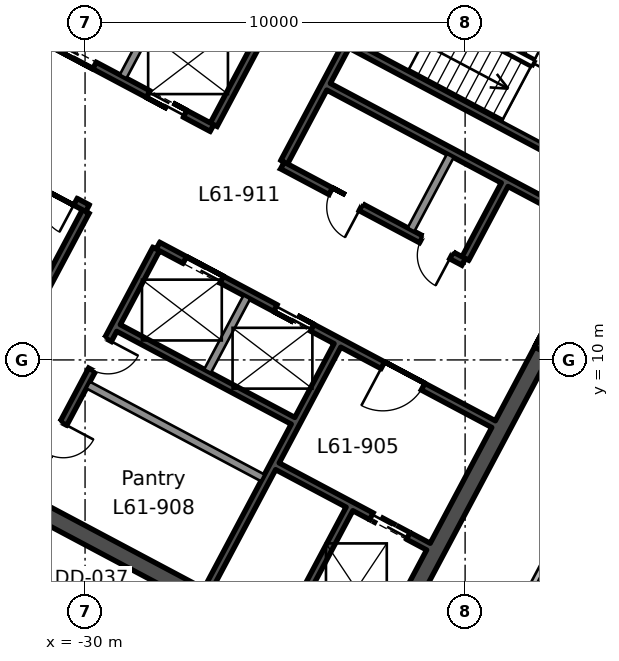
"""IFC4 building model, lengths in metres.
Left out: names, types, materials, properties, quantities, classifications, styles, units other than length and angle.
Written with IfcOpenShell. Run it as: python <this file> out.ifc"""

import sys

from ifc_helpers import new_model, si_unit, direction, frame, frame_2d, origin, place, context, subcontext, project, spatial, rectangle, extrude, element, fill, save


model = new_model("IFC4")
c1 = context("Model", 3, precision=1e-05, world=origin(), true_north=direction((0.0, 1.0)))
c2 = subcontext(c1, "Body", "Model", "MODEL_VIEW")
j1 = project(units=[si_unit("LENGTHUNIT", "METRE"), si_unit("PLANEANGLEUNIT", "RADIAN")], contexts=[c1])
p1 = place(None, origin())
s1 = spatial("IfcSite", under=j1, at=p1, CompositionType="ELEMENT")
p2 = place(p1, origin())
s2 = spatial("IfcBuilding", under=s1, at=p2, CompositionType="ELEMENT")
p3 = place(p2, frame((0.0, 0.0, 273.6)))
s3 = spatial("IfcBuildingStorey", under=s2, at=p3, CompositionType="ELEMENT", Elevation=273.6)
p4 = place(p3, frame((-13.771, 18.138, 0.0), z_axis=(0.0, 0.0, 1.0), x_axis=(-0.469467968382, -0.882949504028, 0.0)))
e1 = element("IfcWall", 1, at=p4, inside=s3, PredefinedType="SHEAR", context=c2, shape_type="SweptSolid", body=[
    extrude(rectangle(XDim=19.1, YDim=0.45, at=frame_2d((9.55, 0.0))), origin(), (0.0, 0.0, 1.0), 3.9),
])
p5 = place(p4, frame((6.55, 0.0, 0.0)))
e2 = element("IfcOpeningElement", 2, at=p5, cuts=e1, PredefinedType="OPENING", context=c2, shape_type="SweptSolid", body=[
    extrude(rectangle(XDim=2.4, YDim=2.4, at=frame_2d((1.2, 1.2))), frame((0.0, 0.235, 0.0), z_axis=(0.0, -1.0, 0.0), x_axis=(1.0, 0.0, 0.0)), (0.0, 0.0, 1.0), 0.47),
])
p6 = place(p3, frame((-14.076, 18.045, 0.0), z_axis=(0.0, 0.0, 1.0), x_axis=(-0.882947755831, 0.46947125628, 0.0)))
e3 = element("IfcWall", 3, at=p6, inside=s3, PredefinedType="SHEAR", context=c2, shape_type="SweptSolid", body=[
    extrude(rectangle(XDim=20.2, YDim=0.45, at=frame_2d((10.1, 0.0))), origin(), (0.0, 0.0, 1.0), 3.9),
])
p7 = place(p3, frame((-22.832, 1.578, 0.0), z_axis=(0.0, 0.0, 1.0), x_axis=(-0.88294509198, 0.469476266226, 0.0)))
e4 = element("IfcWall", 4, at=p7, inside=s3, PredefinedType="SHEAR", context=c2, shape_type="SweptSolid", body=[
    extrude(rectangle(XDim=20.2, YDim=0.45, at=frame_2d((10.1, 0.0))), origin(), (0.0, 0.0, 1.0), 3.9),
])
p8 = place(p3, frame((-23.043, 6.08, 0.0), z_axis=(0.0, 0.0, 1.0), x_axis=(-0.469494272526, -0.882935517501, 0.0)))
e5 = element("IfcWall", 5, at=p8, inside=s3, PredefinedType="SHEAR", context=c2, shape_type="SweptSolid", body=[
    extrude(rectangle(XDim=3.65, YDim=0.2, at=frame_2d((1.825, 0.0))), origin(), (0.0, 0.0, 1.0), 3.9),
])
p9 = place(p3, frame((-18.96, 14.611, 0.0), z_axis=(0.0, 0.0, 1.0), x_axis=(-0.4694473164, -0.882960484464, 0.0)))
e6 = element("IfcWall", 6, at=p9, inside=s3, PredefinedType="SHEAR", context=c2, shape_type="SweptSolid", body=[
    extrude(rectangle(XDim=2.2, YDim=0.2, at=frame_2d((1.1, 0.0))), origin(), (0.0, 0.0, 1.0), 3.9),
])
p10 = place(p3, frame((-20.39, 15.372, 0.0), z_axis=(0.0, 0.0, 1.0), x_axis=(-0.4694473164, -0.882960484464, 0.0)))
e7 = element("IfcWall", 7, at=p10, inside=s3, PredefinedType="SOLIDWALL", context=c2, shape_type="SweptSolid", body=[
    extrude(rectangle(XDim=2.2, YDim=0.2, at=frame_2d((1.1, 0.0))), origin(), (0.0, 0.0, 1.0), 3.9),
])
p11 = place(p3, frame((-23.36, 10.382, 0.0), z_axis=(0.0, 0.0, 1.0), x_axis=(-0.469480409012, -0.88294288918, 0.0)))
e8 = element("IfcWall", 8, at=p11, inside=s3, PredefinedType="SHEAR", context=c2, shape_type="SweptSolid", body=[
    extrude(rectangle(XDim=7.3, YDim=0.2, at=frame_2d((3.65, 0.0))), origin(), (0.0, 0.0, 1.0), 3.9),
])
p12 = place(p3, frame((-25.744, 11.65, 0.0), z_axis=(0.0, 0.0, 1.0), x_axis=(-0.469487830541, -0.882938942948, 0.0)))
e9 = element("IfcWall", 9, at=p12, inside=s3, PredefinedType="SOLIDWALL", context=c2, shape_type="SweptSolid", body=[
    extrude(rectangle(XDim=2.2, YDim=0.2, at=frame_2d((1.1, 0.0))), origin(), (0.0, 0.0, 1.0), 3.9),
])
p13 = place(p3, frame((-21.333, 21.649, 0.0), z_axis=(0.0, 0.0, 1.0), x_axis=(-0.469494272526, -0.882935517501, 0.0)))
e10 = element("IfcWall", 10, at=p13, inside=s3, PredefinedType="SHEAR", context=c2, shape_type="SweptSolid", body=[
    extrude(rectangle(XDim=7.3, YDim=0.2, at=frame_2d((3.65, 0.0))), origin(), (0.0, 0.0, 1.0), 3.9),
])
p14 = place(p13, frame((1.3, 0.0, 0.0)))
e11 = element("IfcOpeningElement", 11, at=p14, cuts=e10, PredefinedType="OPENING", context=c2, shape_type="SweptSolid", body=[
    extrude(rectangle(XDim=1.2, YDim=2.1, at=frame_2d((0.6, 1.05))), frame((0.0, 0.11, 0.0), z_axis=(0.0, -1.0, 0.0), x_axis=(1.0, 0.0, 0.0)), (0.0, 0.0, 1.0), 0.22),
])
p15 = place(p3, frame((-28.128, 12.917, 0.0), z_axis=(0.0, 0.0, 1.0), x_axis=(-0.469454336211, -0.882956752176, 0.0)))
e12 = element("IfcWall", 12, at=p15, inside=s3, PredefinedType="SHEAR", context=c2, shape_type="SweptSolid", body=[
    extrude(rectangle(XDim=7.3, YDim=0.2, at=frame_2d((3.65, 0.0))), origin(), (0.0, 0.0, 1.0), 3.9),
])
p16 = place(p15, frame((2.7, 0.0, 0.0)))
e13 = element("IfcOpeningElement", 13, at=p16, cuts=e12, PredefinedType="OPENING", context=c2, shape_type="SweptSolid", body=[
    extrude(rectangle(XDim=0.9, YDim=2.1, at=frame_2d((0.45, 1.05))), frame((0.0, 0.11, 0.0), z_axis=(0.0, -1.0, 0.0), x_axis=(1.0, 0.0, 0.0)), (0.0, 0.0, 1.0), 0.22),
])
p17 = place(p15, frame((5.2, 0.0, 0.0)))
e14 = element("IfcOpeningElement", 14, at=p17, cuts=e12, PredefinedType="OPENING", context=c2, shape_type="SweptSolid", body=[
    extrude(rectangle(XDim=0.9, YDim=2.1, at=frame_2d((0.45, 1.05))), frame((0.0, 0.11, 0.0), z_axis=(0.0, -1.0, 0.0), x_axis=(1.0, 0.0, 0.0)), (0.0, 0.0, 1.0), 0.22),
])
p18 = place(p3, frame((-23.188, 22.635, 0.0), z_axis=(0.0, 0.0, 1.0), x_axis=(-0.469454336211, -0.882956752176, 0.0)))
e15 = element("IfcWall", 15, at=p18, inside=s3, PredefinedType="SHEAR", context=c2, shape_type="SweptSolid", body=[
    extrude(rectangle(XDim=7.3, YDim=0.2, at=frame_2d((3.65, 0.0))), origin(), (0.0, 0.0, 1.0), 3.9),
])
p19 = place(p18, frame((0.8, 0.0, 0.0)))
e16 = element("IfcOpeningElement", 16, at=p19, cuts=e15, PredefinedType="OPENING", context=c2, shape_type="SweptSolid", body=[
    extrude(rectangle(XDim=0.9, YDim=2.1, at=frame_2d((0.45, 1.05))), frame((0.0, 0.11, 0.0), z_axis=(0.0, -1.0, 0.0), x_axis=(1.0, 0.0, 0.0)), (0.0, 0.0, 1.0), 0.22),
])
p20 = place(p18, frame((3.3, 0.0, 0.0)))
e17 = element("IfcOpeningElement", 17, at=p20, cuts=e15, PredefinedType="OPENING", context=c2, shape_type="SweptSolid", body=[
    extrude(rectangle(XDim=0.9, YDim=2.1, at=frame_2d((0.45, 1.05))), frame((0.0, 0.11, 0.0), z_axis=(0.0, -1.0, 0.0), x_axis=(1.0, 0.0, 0.0)), (0.0, 0.0, 1.0), 0.22),
])
p21 = place(p3, frame((-29.982, 13.903, 0.0), z_axis=(0.0, 0.0, 1.0), x_axis=(-0.469454336211, -0.882956752176, 0.0)))
e18 = element("IfcWall", 18, at=p21, inside=s3, PredefinedType="SHEAR", context=c2, shape_type="SweptSolid", body=[
    extrude(rectangle(XDim=7.3, YDim=0.2, at=frame_2d((3.65, 0.0))), origin(), (0.0, 0.0, 1.0), 3.9),
])
p22 = place(p21, frame((4.8, 0.0, 0.0)))
e19 = element("IfcOpeningElement", 19, at=p22, cuts=e18, PredefinedType="OPENING", context=c2, shape_type="SweptSolid", body=[
    extrude(rectangle(XDim=1.2, YDim=2.1, at=frame_2d((0.6, 1.05))), frame((0.0, 0.11, 0.0), z_axis=(0.0, -1.0, 0.0), x_axis=(1.0, 0.0, 0.0)), (0.0, 0.0, 1.0), 0.22),
])
p23 = place(p3, frame((-27.966, 19.4, 0.0), z_axis=(0.0, 0.0, 1.0), x_axis=(-0.4694473164, -0.882960484464, 0.0)))
e20 = element("IfcWall", 20, at=p23, inside=s3, PredefinedType="SOLIDWALL", context=c2, shape_type="SweptSolid", body=[
    extrude(rectangle(XDim=2.2, YDim=0.2, at=frame_2d((1.1, 0.0))), origin(), (0.0, 0.0, 1.0), 3.9),
])
p24 = place(p3, frame((-15.942, 14.536, 0.0), z_axis=(0.0, 0.0, 1.0), x_axis=(-0.882946947542, 0.469472776449, 0.0)))
e21 = element("IfcWall", 21, at=p24, inside=s3, PredefinedType="SHEAR", context=c2, shape_type="SweptSolid", body=[
    extrude(rectangle(XDim=8.0, YDim=0.2, at=frame_2d((4.0, 0.0))), origin(), (0.0, 0.0, 1.0), 3.9),
])
p25 = place(p3, frame((-16.529, 13.432, 0.0), z_axis=(0.0, 0.0, 1.0), x_axis=(-0.88295287151, 0.469461634952, 0.0)))
e22 = element("IfcWall", 22, at=p25, inside=s3, PredefinedType="SHEAR", context=c2, shape_type="SweptSolid", body=[
    extrude(rectangle(XDim=8.0, YDim=0.2, at=frame_2d((4.0, 0.0))), origin(), (0.0, 0.0, 1.0), 3.9),
])
p26 = place(p3, frame((-20.04, 12.581, 0.0), z_axis=(0.0, 0.0, 1.0), x_axis=(-0.882942972946, 0.469480251476, 0.0)))
e23 = element("IfcWall", 23, at=p26, inside=s3, PredefinedType="SHEAR", context=c2, shape_type="SweptSolid", body=[
    extrude(rectangle(XDim=5.4, YDim=0.2, at=frame_2d((2.7, 0.0))), origin(), (0.0, 0.0, 1.0), 3.9),
])
p27 = place(p26, frame((0.36, 0.0, 0.0)))
e24 = element("IfcOpeningElement", 24, at=p27, cuts=e23, PredefinedType="OPENING", context=c2, shape_type="SweptSolid", body=[
    extrude(rectangle(XDim=0.9, YDim=2.1, at=frame_2d((0.45, 1.05))), frame((0.0, 0.11, 0.0), z_axis=(0.0, -1.0, 0.0), x_axis=(1.0, 0.0, 0.0)), (0.0, 0.0, 1.0), 0.22),
])
p28 = place(p26, frame((3.06, 0.0, 0.0)))
e25 = element("IfcOpeningElement", 25, at=p28, cuts=e23, PredefinedType="OPENING", context=c2, shape_type="SweptSolid", body=[
    extrude(rectangle(XDim=0.9, YDim=2.1, at=frame_2d((0.45, 1.05))), frame((0.0, 0.11, 0.0), z_axis=(0.0, -1.0, 0.0), x_axis=(1.0, 0.0, 0.0)), (0.0, 0.0, 1.0), 0.22),
])
p29 = place(p3, frame((-26.662, 16.102, 0.0), z_axis=(0.0, 0.0, 1.0), x_axis=(-0.882940221191, 0.469485426614, 0.0)))
e26 = element("IfcWall", 26, at=p29, inside=s3, PredefinedType="SHEAR", context=c2, shape_type="SweptSolid", body=[
    extrude(rectangle(XDim=10.0, YDim=0.2, at=frame_2d((5.0, 0.0))), origin(), (0.0, 0.0, 1.0), 3.9),
])
p30 = place(p29, frame((6.3, 0.0, 0.0)))
e27 = element("IfcOpeningElement", 27, at=p30, cuts=e26, PredefinedType="OPENING", context=c2, shape_type="SweptSolid", body=[
    extrude(rectangle(XDim=1.2, YDim=2.1, at=frame_2d((0.6, 1.05))), frame((0.0, 0.11, 0.0), z_axis=(0.0, -1.0, 0.0), x_axis=(1.0, 0.0, 0.0)), (0.0, 0.0, 1.0), 0.22),
])
p31 = place(p29, frame((0.8, 0.0, 0.0)))
e28 = element("IfcOpeningElement", 28, at=p31, cuts=e26, PredefinedType="OPENING", context=c2, shape_type="SweptSolid", body=[
    extrude(rectangle(XDim=1.1, YDim=2.1, at=frame_2d((0.55, 1.05))), frame((0.0, 0.11, 0.0), z_axis=(0.0, -1.0, 0.0), x_axis=(1.0, 0.0, 0.0)), (0.0, 0.0, 1.0), 0.22),
])
p32 = place(p29, frame((3.5, 0.0, 0.0)))
e29 = element("IfcOpeningElement", 29, at=p32, cuts=e26, PredefinedType="OPENING", context=c2, shape_type="SweptSolid", body=[
    extrude(rectangle(XDim=1.1, YDim=2.1, at=frame_2d((0.55, 1.05))), frame((0.0, 0.11, 0.0), z_axis=(0.0, -1.0, 0.0), x_axis=(1.0, 0.0, 0.0)), (0.0, 0.0, 1.0), 0.22),
])
p33 = place(p3, frame((-19.252, 8.311, 0.0), z_axis=(0.0, 0.0, 1.0), x_axis=(-0.882955722218, 0.469456273365, 0.0)))
e30 = element("IfcWall", 30, at=p33, inside=s3, PredefinedType="SHEAR", context=c2, shape_type="SweptSolid", body=[
    extrude(rectangle(XDim=10.0, YDim=0.2, at=frame_2d((5.0, 0.0))), origin(), (0.0, 0.0, 1.0), 3.9),
])
p34 = place(p33, frame((2.1, 0.0, 0.0)))
e31 = element("IfcOpeningElement", 31, at=p34, cuts=e30, PredefinedType="OPENING", context=c2, shape_type="SweptSolid", body=[
    extrude(rectangle(XDim=1.2, YDim=2.1, at=frame_2d((0.6, 1.05))), frame((0.0, 0.11, 0.0), z_axis=(0.0, -1.0, 0.0), x_axis=(1.0, 0.0, 0.0)), (0.0, 0.0, 1.0), 0.22),
])
p35 = place(p33, frame((5.4, 0.0, 0.0)))
e32 = element("IfcOpeningElement", 32, at=p35, cuts=e30, PredefinedType="OPENING", context=c2, shape_type="SweptSolid", body=[
    extrude(rectangle(XDim=1.1, YDim=2.1, at=frame_2d((0.55, 1.05))), frame((0.0, 0.11, 0.0), z_axis=(0.0, -1.0, 0.0), x_axis=(1.0, 0.0, 0.0)), (0.0, 0.0, 1.0), 0.22),
])
p36 = place(p33, frame((8.1, 0.0, 0.0)))
e33 = element("IfcOpeningElement", 33, at=p36, cuts=e30, PredefinedType="OPENING", context=c2, shape_type="SweptSolid", body=[
    extrude(rectangle(XDim=1.1, YDim=2.1, at=frame_2d((0.55, 1.05))), frame((0.0, 0.11, 0.0), z_axis=(0.0, -1.0, 0.0), x_axis=(1.0, 0.0, 0.0)), (0.0, 0.0, 1.0), 0.22),
])
p37 = place(p3, frame((-29.935, 13.991, 0.0), z_axis=(0.0, 0.0, 1.0), x_axis=(-0.882952937579, 0.469461510692, 0.0)))
e34 = element("IfcWall", 34, at=p37, inside=s3, PredefinedType="SHEAR", context=c2, shape_type="SweptSolid", body=[
    extrude(rectangle(XDim=5.4, YDim=0.2, at=frame_2d((2.7, 0.0))), origin(), (0.0, 0.0, 1.0), 3.9),
])
p38 = place(p37, frame((0.36, 0.0, 0.0)))
e35 = element("IfcOpeningElement", 35, at=p38, cuts=e34, PredefinedType="OPENING", context=c2, shape_type="SweptSolid", body=[
    extrude(rectangle(XDim=0.9, YDim=2.1, at=frame_2d((0.45, 1.05))), frame((0.0, 0.11, 0.0), z_axis=(0.0, -1.0, 0.0), x_axis=(1.0, 0.0, 0.0)), (0.0, 0.0, 1.0), 0.22),
])
p39 = place(p37, frame((3.06, 0.0, 0.0)))
e36 = element("IfcOpeningElement", 36, at=p39, cuts=e34, PredefinedType="OPENING", context=c2, shape_type="SweptSolid", body=[
    extrude(rectangle(XDim=0.9, YDim=2.1, at=frame_2d((0.45, 1.05))), frame((0.0, 0.11, 0.0), z_axis=(0.0, -1.0, 0.0), x_axis=(1.0, 0.0, 0.0)), (0.0, 0.0, 1.0), 0.22),
])
p40 = place(p3, frame((-24.528, 8.398, 0.0), z_axis=(0.0, 0.0, 1.0), x_axis=(-0.882953967957, 0.469459572775, 0.0)))
e37 = element("IfcWall", 37, at=p40, inside=s3, PredefinedType="SHEAR", context=c2, shape_type="SweptSolid", body=[
    extrude(rectangle(XDim=5.2, YDim=0.2, at=frame_2d((2.6, 0.0))), origin(), (0.0, 0.0, 1.0), 3.9),
])
p41 = place(p3, frame((-20.965, 5.088, 0.0), z_axis=(0.0, 0.0, 1.0), x_axis=(-0.882925986334, 0.469512196493, 0.0)))
e38 = element("IfcWall", 38, at=p41, inside=s3, PredefinedType="SHEAR", context=c2, shape_type="SweptSolid", body=[
    extrude(rectangle(XDim=4.5, YDim=0.2, at=frame_2d((2.25, 0.0))), origin(), (0.0, 0.0, 1.0), 3.9),
])
p42 = place(p41, frame((0.6, 0.0, 0.0)))
e39 = element("IfcOpeningElement", 39, at=p42, cuts=e38, PredefinedType="OPENING", context=c2, shape_type="SweptSolid", body=[
    extrude(rectangle(XDim=1.1, YDim=2.1, at=frame_2d((0.55, 1.05))), frame((0.0, 0.11, 0.0), z_axis=(0.0, -1.0, 0.0), x_axis=(1.0, 0.0, 0.0)), (0.0, 0.0, 1.0), 0.22),
])
p43 = place(p3, frame((-25.326, 6.897, 0.0), z_axis=(0.0, 0.0, 1.0), x_axis=(-0.882953967957, 0.469459572775, 0.0)))
e40 = element("IfcWall", 40, at=p43, inside=s3, PredefinedType="SOLIDWALL", context=c2, shape_type="SweptSolid", body=[
    extrude(rectangle(XDim=5.2, YDim=0.2, at=frame_2d((2.6, 0.0))), origin(), (0.0, 0.0, 1.0), 3.9),
])
p44 = place(p3, frame((-48.812, 39.771, 0.0), z_axis=(0.0, 0.0, 1.0), x_axis=(0.882945384259, -0.469475716535, 0.0)))
e41 = element("IfcWall", 41, at=p44, inside=s3, PredefinedType="PARTITIONING", context=c2, shape_type="SweptSolid", body=[
    extrude(rectangle(XDim=55.283, YDim=0.15, at=frame_2d((27.642, 0.0))), origin(), (0.0, 0.0, 1.0), 3.54),
])
p45 = place(p44, frame((33.85, 0.0, 0.0)))
e42 = element("IfcOpeningElement", 42, at=p45, cuts=e41, PredefinedType="OPENING", context=c2, shape_type="SweptSolid", body=[
    extrude(rectangle(XDim=1.8, YDim=2.1, at=frame_2d((0.9, 1.05))), frame((0.0, 0.085, 0.0), z_axis=(0.0, -1.0, 0.0), x_axis=(1.0, 0.0, 0.0)), (0.0, 0.0, 1.0), 0.17),
])
p46 = place(p44, frame((27.15, 0.0, 0.0)))
e43 = element("IfcOpeningElement", 43, at=p46, cuts=e41, PredefinedType="OPENING", context=c2, shape_type="SweptSolid", body=[
    extrude(rectangle(XDim=1.0, YDim=2.1, at=frame_2d((0.5, 1.05))), frame((0.0, 0.085, 0.0), z_axis=(0.0, -1.0, 0.0), x_axis=(1.0, 0.0, 0.0)), (0.0, 0.0, 1.0), 0.17),
])
p47 = place(p44, frame((15.55, 0.0, 0.0)))
e44 = element("IfcOpeningElement", 44, at=p47, cuts=e41, PredefinedType="OPENING", context=c2, shape_type="SweptSolid", body=[
    extrude(rectangle(XDim=1.0, YDim=2.1, at=frame_2d((0.5, 1.05))), frame((0.0, 0.085, 0.0), z_axis=(0.0, -1.0, 0.0), x_axis=(1.0, 0.0, 0.0)), (0.0, 0.0, 1.0), 0.17),
])
p48 = place(p3, frame((-13.8, -6.48, 0.0), z_axis=(0.0, 0.0, 1.0), x_axis=(-0.882943991273, 0.469478336322, 0.0)))
e45 = element("IfcWall", 45, at=p48, inside=s3, PredefinedType="PARTITIONING", context=c2, shape_type="SweptSolid", body=[
    extrude(rectangle(XDim=36.33, YDim=0.15, at=frame_2d((18.165, 0.0))), origin(), (0.0, 0.0, 1.0), 3.54),
])
p49 = place(p48, frame((20.15, 0.0, 0.0)))
e46 = element("IfcOpeningElement", 46, at=p49, cuts=e45, PredefinedType="OPENING", context=c2, shape_type="SweptSolid", body=[
    extrude(rectangle(XDim=1.0, YDim=2.1, at=frame_2d((0.5, 1.05))), frame((0.0, 0.085, 0.0), z_axis=(0.0, -1.0, 0.0), x_axis=(1.0, 0.0, 0.0)), (0.0, 0.0, 1.0), 0.17),
])
p50 = place(p48, frame((17.25, 0.0, 0.0)))
e47 = element("IfcOpeningElement", 47, at=p50, cuts=e45, PredefinedType="OPENING", context=c2, shape_type="SweptSolid", body=[
    extrude(rectangle(XDim=1.8, YDim=2.1, at=frame_2d((0.9, 1.05))), frame((0.0, 0.085, 0.0), z_axis=(0.0, -1.0, 0.0), x_axis=(1.0, 0.0, 0.0)), (0.0, 0.0, 1.0), 0.17),
])
p51 = place(p3, frame((-20.588, -0.379, 0.0), z_axis=(0.0, 0.0, 1.0), x_axis=(0.469489882812, 0.882937851685, 0.0)))
e48 = element("IfcWall", 48, at=p51, inside=s3, PredefinedType="PARTITIONING", context=c2, shape_type="SweptSolid", body=[
    extrude(rectangle(XDim=20.0, YDim=0.15, at=frame_2d((10.0, 0.0))), origin(), (0.0, 0.0, 1.0), 3.54),
])
p52 = place(p51, frame((9.55, 0.0, 0.0)))
e49 = element("IfcOpeningElement", 49, at=p52, cuts=e48, PredefinedType="OPENING", context=c2, shape_type="SweptSolid", body=[
    extrude(rectangle(XDim=1.0, YDim=2.1, at=frame_2d((0.5, 1.05))), frame((0.0, 0.085, 0.0), z_axis=(0.0, -1.0, 0.0), x_axis=(1.0, 0.0, 0.0)), (0.0, 0.0, 1.0), 0.17),
])
p53 = place(p34, origin())
e50 = element("IfcDoor", 50, at=p53, inside=s3, OperationType="SINGLE_SWING_RIGHT", PredefinedType="DOOR", context=c2, shape_type="SweptSolid", body=[
    extrude(rectangle(XDim=1.2, YDim=2.1, at=frame_2d((0.6, 1.05))), frame((0.0, 0.025, 0.0), z_axis=(0.0, -1.0, 0.0), x_axis=(1.0, 0.0, 0.0)), (0.0, 0.0, 1.0), 0.05),
])
fill(e31, e50)
p54 = place(p38, origin())
e51 = element("IfcDoor", 51, at=p54, inside=s3, OperationType="SINGLE_SWING_LEFT", PredefinedType="DOOR", context=c2, shape_type="SweptSolid", body=[
    extrude(rectangle(XDim=0.9, YDim=2.1, at=frame_2d((0.45, 1.05))), frame((0.0, 0.025, 0.0), z_axis=(0.0, -1.0, 0.0), x_axis=(1.0, 0.0, 0.0)), (0.0, 0.0, 1.0), 0.05),
])
fill(e35, e51)
p55 = place(p27, origin())
e52 = element("IfcDoor", 52, at=p55, inside=s3, OperationType="SINGLE_SWING_LEFT", PredefinedType="DOOR", context=c2, shape_type="SweptSolid", body=[
    extrude(rectangle(XDim=0.9, YDim=2.1, at=frame_2d((0.45, 1.05))), frame((0.0, 0.025, 0.0), z_axis=(0.0, -1.0, 0.0), x_axis=(1.0, 0.0, 0.0)), (0.0, 0.0, 1.0), 0.05),
])
fill(e24, e52)
p56 = place(p28, origin())
e53 = element("IfcDoor", 53, at=p56, inside=s3, OperationType="SINGLE_SWING_LEFT", PredefinedType="DOOR", context=c2, shape_type="SweptSolid", body=[
    extrude(rectangle(XDim=0.9, YDim=2.1, at=frame_2d((0.45, 1.05))), frame((0.0, 0.025, 0.0), z_axis=(0.0, -1.0, 0.0), x_axis=(1.0, 0.0, 0.0)), (0.0, 0.0, 1.0), 0.05),
])
fill(e25, e53)
p57 = place(p35, origin())
e54 = element("IfcDoor", 54, at=p57, inside=s3, OperationType="DOUBLE_DOOR_SLIDING", PredefinedType="DOOR", context=c2, shape_type="SweptSolid", body=[
    extrude(rectangle(XDim=1.1, YDim=2.1, at=frame_2d((0.55, 1.05))), frame((0.0, 0.025, 0.0), z_axis=(0.0, -1.0, 0.0), x_axis=(1.0, 0.0, 0.0)), (0.0, 0.0, 1.0), 0.05),
])
fill(e32, e54)
p58 = place(p36, origin())
e55 = element("IfcDoor", 55, at=p58, inside=s3, OperationType="DOUBLE_DOOR_SLIDING", PredefinedType="DOOR", context=c2, shape_type="SweptSolid", body=[
    extrude(rectangle(XDim=1.1, YDim=2.1, at=frame_2d((0.55, 1.05))), frame((0.0, 0.025, 0.0), z_axis=(0.0, -1.0, 0.0), x_axis=(1.0, 0.0, 0.0)), (0.0, 0.0, 1.0), 0.05),
])
fill(e33, e55)
p59 = place(p31, origin())
e56 = element("IfcDoor", 56, at=p59, inside=s3, OperationType="DOUBLE_DOOR_SLIDING", PredefinedType="DOOR", context=c2, shape_type="SweptSolid", body=[
    extrude(rectangle(XDim=1.1, YDim=2.1, at=frame_2d((0.55, 1.05))), frame((0.0, 0.025, 0.0), z_axis=(0.0, -1.0, 0.0), x_axis=(1.0, 0.0, 0.0)), (0.0, 0.0, 1.0), 0.05),
])
fill(e28, e56)
p60 = place(p32, origin())
e57 = element("IfcDoor", 57, at=p60, inside=s3, OperationType="DOUBLE_DOOR_SLIDING", PredefinedType="DOOR", context=c2, shape_type="SweptSolid", body=[
    extrude(rectangle(XDim=1.1, YDim=2.1, at=frame_2d((0.55, 1.05))), frame((0.0, 0.025, 0.0), z_axis=(0.0, -1.0, 0.0), x_axis=(1.0, 0.0, 0.0)), (0.0, 0.0, 1.0), 0.05),
])
fill(e29, e57)
p61 = place(p42, origin())
e58 = element("IfcDoor", 58, at=p61, inside=s3, OperationType="DOUBLE_DOOR_SLIDING", PredefinedType="DOOR", context=c2, shape_type="SweptSolid", body=[
    extrude(rectangle(XDim=1.1, YDim=2.1, at=frame_2d((0.55, 1.05))), frame((0.0, 0.025, 0.0), z_axis=(0.0, -1.0, 0.0), x_axis=(1.0, 0.0, 0.0)), (0.0, 0.0, 1.0), 0.05),
])
fill(e39, e58)
p62 = place(p16, origin())
e59 = element("IfcDoor", 59, at=p62, inside=s3, OperationType="SINGLE_SWING_LEFT", PredefinedType="DOOR", context=c2, shape_type="SweptSolid", body=[
    extrude(rectangle(XDim=0.9, YDim=2.1, at=frame_2d((0.45, 1.05))), frame((0.0, 0.025, 0.0), z_axis=(0.0, -1.0, 0.0), x_axis=(1.0, 0.0, 0.0)), (0.0, 0.0, 1.0), 0.05),
])
fill(e13, e59)
p63 = place(p17, origin())
e60 = element("IfcDoor", 60, at=p63, inside=s3, OperationType="SINGLE_SWING_LEFT", PredefinedType="DOOR", context=c2, shape_type="SweptSolid", body=[
    extrude(rectangle(XDim=0.9, YDim=2.1, at=frame_2d((0.45, 1.05))), frame((0.0, 0.025, 0.0), z_axis=(0.0, -1.0, 0.0), x_axis=(1.0, 0.0, 0.0)), (0.0, 0.0, 1.0), 0.05),
])
fill(e14, e60)
save(model, sys.argv[1])
